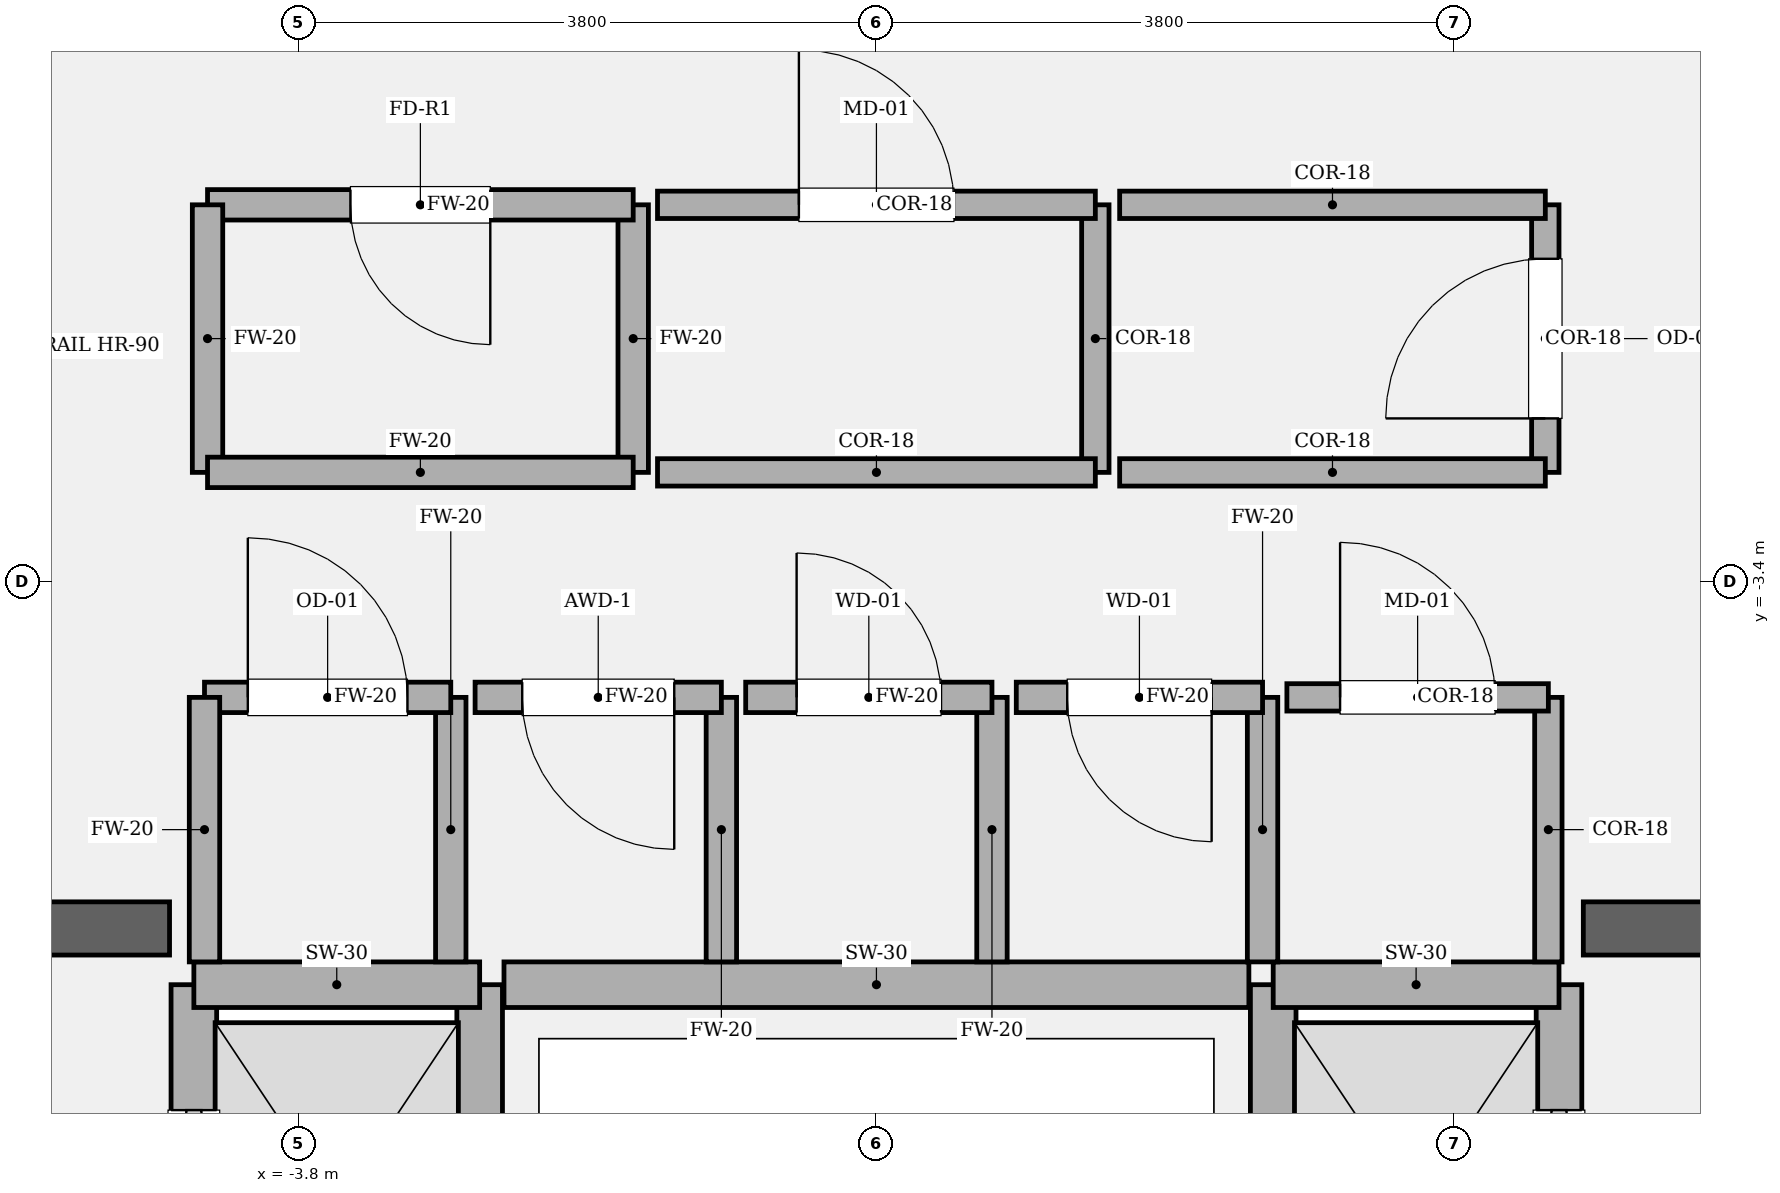
"""IFC4 building model, lengths in metres.
Left out: names, types, materials, properties, quantities, classifications, styles, units other than length and angle.
Written with IfcOpenShell. Run it as: python <this file> out.ifc"""

import sys

from ifc_helpers import new_model, si_unit, direction, frame, frame_2d, origin, place, context, subcontext, project, spatial, rectangle, extrude, element, fill, save


model = new_model("IFC4")
c1 = context("Model", 3, precision=1e-05, world=origin(), true_north=direction((0.0, 1.0)))
c2 = subcontext(c1, "Body", "Model", "MODEL_VIEW")
j1 = project(units=[si_unit("LENGTHUNIT", "METRE"), si_unit("PLANEANGLEUNIT", "RADIAN")], contexts=[c1])
p1 = place(None, origin())
s1 = spatial("IfcSite", under=j1, at=p1, CompositionType="ELEMENT")
p2 = place(p1, origin())
s2 = spatial("IfcBuilding", under=s1, at=p2, CompositionType="ELEMENT")
p3 = place(p2, frame((0.0, 0.0, 168.15)))
s3 = spatial("IfcBuildingStorey", under=s2, at=p3, CompositionType="ELEMENT", Elevation=168.15)
p4 = place(p3, frame((-9.875, -5.68, 0.0), z_axis=(0.0, 0.0, 1.0), x_axis=(1.0, 0.0, 0.0)))
e1 = element("IfcWall", 1, at=p4, inside=s3, PredefinedType="SOLIDWALL", context=c2, shape_type="SweptSolid", body=[
    extrude(rectangle(XDim=5.225, YDim=0.35, at=frame_2d((2.613, 0.0))), origin(), (0.0, 0.0, 1.0), 4.05),
])
p5 = place(p4, frame((1.335, 0.0, 0.0)))
e2 = element("IfcOpeningElement", 2, at=p5, cuts=e1, PredefinedType="OPENING", context=c2, shape_type="SweptSolid", body=[
    extrude(rectangle(XDim=1.18, YDim=2.2, at=frame_2d((0.59, 1.1))), frame((0.0, 0.185, 0.0), z_axis=(0.0, -1.0, 0.0), x_axis=(1.0, 0.0, 0.0)), (0.0, 0.0, 1.0), 0.37),
])
p6 = place(p3, frame((4.65, -5.68, 0.0), z_axis=(0.0, 0.0, 1.0), x_axis=(1.0, 0.0, 0.0)))
e3 = element("IfcWall", 3, at=p6, inside=s3, PredefinedType="SOLIDWALL", context=c2, shape_type="SweptSolid", body=[
    extrude(rectangle(XDim=5.225, YDim=0.35, at=frame_2d((2.613, 0.0))), origin(), (0.0, 0.0, 1.0), 4.05),
])
p7 = place(p6, frame((2.71, 0.0, 0.0)))
e4 = element("IfcOpeningElement", 4, at=p7, cuts=e3, PredefinedType="OPENING", context=c2, shape_type="SweptSolid", body=[
    extrude(rectangle(XDim=1.18, YDim=2.2, at=frame_2d((0.59, 1.1))), frame((0.0, 0.185, 0.0), z_axis=(0.0, -1.0, 0.0), x_axis=(1.0, 0.0, 0.0)), (0.0, 0.0, 1.0), 0.37),
])
p8 = place(p3, frame((-4.49, -8.82, 0.0), z_axis=(0.0, 0.0, 1.0), x_axis=(0.0, 1.0, 0.0)))
e5 = element("IfcWall", 5, at=p8, inside=s3, PredefinedType="SOLIDWALL", context=c2, shape_type="SweptSolid", body=[
    extrude(rectangle(XDim=2.77, YDim=0.3, at=frame_2d((1.385, 0.0))), origin(), (0.0, 0.0, 1.0), 3.77),
])
p9 = place(p8, frame((0.825, 0.0, 0.0)))
e6 = element("IfcOpeningElement", 6, at=p9, cuts=e5, PredefinedType="OPENING", context=c2, shape_type="SweptSolid", body=[
    extrude(rectangle(XDim=1.12, YDim=2.25, at=frame_2d((0.56, 1.125))), frame((0.0, 0.16, 0.0), z_axis=(0.0, -1.0, 0.0), x_axis=(1.0, 0.0, 0.0)), (0.0, 0.0, 1.0), 0.32),
])
p10 = place(p3, frame((-2.61, -8.82, 0.0), z_axis=(0.0, 0.0, 1.0), x_axis=(0.0, 1.0, 0.0)))
e7 = element("IfcWall", 7, at=p10, inside=s3, PredefinedType="SOLIDWALL", context=c2, shape_type="SweptSolid", body=[
    extrude(rectangle(XDim=2.77, YDim=0.3, at=frame_2d((1.385, 0.0))), origin(), (0.0, 0.0, 1.0), 3.77),
])
p11 = place(p3, frame((-4.49, -6.05, 0.0), z_axis=(0.0, 0.0, 1.0), x_axis=(1.0, 0.0, 0.0)))
e8 = element("IfcWall", 8, at=p11, inside=s3, PredefinedType="SOLIDWALL", context=c2, shape_type="SweptSolid", body=[
    extrude(rectangle(XDim=1.88, YDim=0.3, at=frame_2d((0.94, 0.0))), origin(), (0.0, 0.0, 1.0), 3.77),
])
p12 = place(p3, frame((4.49, -8.82, 0.0), z_axis=(0.0, 0.0, 1.0), x_axis=(0.0, 1.0, 0.0)))
e9 = element("IfcWall", 9, at=p12, inside=s3, PredefinedType="SOLIDWALL", context=c2, shape_type="SweptSolid", body=[
    extrude(rectangle(XDim=2.77, YDim=0.3, at=frame_2d((1.385, 0.0))), origin(), (0.0, 0.0, 1.0), 3.77),
])
p13 = place(p12, frame((0.825, 0.0, 0.0)))
e10 = element("IfcOpeningElement", 10, at=p13, cuts=e9, PredefinedType="OPENING", context=c2, shape_type="SweptSolid", body=[
    extrude(rectangle(XDim=1.12, YDim=2.25, at=frame_2d((0.56, 1.125))), frame((0.0, 0.16, 0.0), z_axis=(0.0, -1.0, 0.0), x_axis=(1.0, 0.0, 0.0)), (0.0, 0.0, 1.0), 0.32),
])
p14 = place(p3, frame((2.61, -8.82, 0.0), z_axis=(0.0, 0.0, 1.0), x_axis=(0.0, 1.0, 0.0)))
e11 = element("IfcWall", 11, at=p14, inside=s3, PredefinedType="SOLIDWALL", context=c2, shape_type="SweptSolid", body=[
    extrude(rectangle(XDim=2.77, YDim=0.3, at=frame_2d((1.385, 0.0))), origin(), (0.0, 0.0, 1.0), 3.77),
])
p15 = place(p3, frame((2.61, -6.05, 0.0), z_axis=(0.0, 0.0, 1.0), x_axis=(1.0, 0.0, 0.0)))
e12 = element("IfcWall", 12, at=p15, inside=s3, PredefinedType="SOLIDWALL", context=c2, shape_type="SweptSolid", body=[
    extrude(rectangle(XDim=1.88, YDim=0.3, at=frame_2d((0.94, 0.0))), origin(), (0.0, 0.0, 1.0), 3.77),
])
p16 = place(p3, frame((-2.45, -6.05, 0.0), z_axis=(0.0, 0.0, 1.0), x_axis=(1.0, 0.0, 0.0)))
e13 = element("IfcWall", 13, at=p16, inside=s3, PredefinedType="SOLIDWALL", context=c2, shape_type="SweptSolid", body=[
    extrude(rectangle(XDim=4.9, YDim=0.3, at=frame_2d((2.45, 0.0))), origin(), (0.0, 0.0, 1.0), 3.77),
])
p17 = place(p3, frame((-2.8, -5.9, 0.0), z_axis=(0.0, 0.0, 1.0), x_axis=(0.0, 1.0, 0.0)))
e14 = element("IfcWall", 14, at=p17, inside=s3, PredefinedType="SOLIDWALL", context=c2, shape_type="SweptSolid", body=[
    extrude(rectangle(XDim=1.74, YDim=0.2, at=frame_2d((0.87, 0.0))), origin(), (0.0, 0.0, 1.0), 3.77),
])
p18 = place(p3, frame((-2.8, -4.16, 0.0), z_axis=(0.0, 0.0, 1.0), x_axis=(-1.0, 0.0, 0.0)))
e15 = element("IfcWall", 15, at=p18, inside=s3, PredefinedType="SOLIDWALL", context=c2, shape_type="SweptSolid", body=[
    extrude(rectangle(XDim=1.62, YDim=0.2, at=frame_2d((0.81, 0.0))), origin(), (0.0, 0.0, 1.0), 3.77),
])
p19 = place(p18, frame((0.285, 0.0, 0.0)))
e16 = element("IfcOpeningElement", 16, at=p19, cuts=e15, PredefinedType="OPENING", context=c2, shape_type="SweptSolid", body=[
    extrude(rectangle(XDim=1.05, YDim=2.2, at=frame_2d((0.525, 1.1))), frame((0.0, 0.11, 0.0), z_axis=(0.0, -1.0, 0.0), x_axis=(1.0, 0.0, 0.0)), (0.0, 0.0, 1.0), 0.22),
])
for number, where, z_axis, x_axis in (
    (17, (-4.42, -4.16, 0.0), (0.0, 0.0, 1.0), (0.0, -1.0, 0.0)),
    (18, (-1.02, -5.9, 0.0), (0.0, 0.0, 1.0), (0.0, 1.0, 0.0)),
):
    element("IfcWall", number, at=place(p3, frame(where, z_axis=z_axis, x_axis=x_axis)), inside=s3, PredefinedType="SOLIDWALL", context=c2, shape_type="SweptSolid", body=[
        extrude(rectangle(XDim=1.74, YDim=0.2, at=frame_2d((0.87, 0.0))), origin(), (0.0, 0.0, 1.0), 3.77),
    ])
p20 = place(p3, frame((-1.02, -4.16, 0.0), z_axis=(0.0, 0.0, 1.0), x_axis=(-1.0, 0.0, 0.0)))
e19 = element("IfcWall", 19, at=p20, inside=s3, PredefinedType="SOLIDWALL", context=c2, shape_type="SweptSolid", body=[
    extrude(rectangle(XDim=1.62, YDim=0.2, at=frame_2d((0.81, 0.0))), origin(), (0.0, 0.0, 1.0), 3.77),
])
p21 = place(p20, frame((0.31, 0.0, 0.0)))
e20 = element("IfcOpeningElement", 20, at=p21, cuts=e19, PredefinedType="OPENING", context=c2, shape_type="SweptSolid", body=[
    extrude(rectangle(XDim=1.0, YDim=2.15, at=frame_2d((0.5, 1.075))), frame((0.0, 0.11, 0.0), z_axis=(0.0, -1.0, 0.0), x_axis=(1.0, 0.0, 0.0)), (0.0, 0.0, 1.0), 0.22),
])
p22 = place(p3, frame((0.76, -5.9, 0.0), z_axis=(0.0, 0.0, 1.0), x_axis=(0.0, 1.0, 0.0)))
e21 = element("IfcWall", 21, at=p22, inside=s3, PredefinedType="SOLIDWALL", context=c2, shape_type="SweptSolid", body=[
    extrude(rectangle(XDim=1.74, YDim=0.2, at=frame_2d((0.87, 0.0))), origin(), (0.0, 0.0, 1.0), 3.77),
])
p23 = place(p3, frame((0.76, -4.16, 0.0), z_axis=(0.0, 0.0, 1.0), x_axis=(-1.0, 0.0, 0.0)))
e22 = element("IfcWall", 22, at=p23, inside=s3, PredefinedType="SOLIDWALL", context=c2, shape_type="SweptSolid", body=[
    extrude(rectangle(XDim=1.62, YDim=0.2, at=frame_2d((0.81, 0.0))), origin(), (0.0, 0.0, 1.0), 3.77),
])
p24 = place(p23, frame((0.335, 0.0, 0.0)))
e23 = element("IfcOpeningElement", 23, at=p24, cuts=e22, PredefinedType="OPENING", context=c2, shape_type="SweptSolid", body=[
    extrude(rectangle(XDim=0.95, YDim=2.15, at=frame_2d((0.475, 1.075))), frame((0.0, 0.11, 0.0), z_axis=(0.0, -1.0, 0.0), x_axis=(1.0, 0.0, 0.0)), (0.0, 0.0, 1.0), 0.22),
])
p25 = place(p3, frame((2.54, -5.9, 0.0), z_axis=(0.0, 0.0, 1.0), x_axis=(0.0, 1.0, 0.0)))
e24 = element("IfcWall", 24, at=p25, inside=s3, PredefinedType="SOLIDWALL", context=c2, shape_type="SweptSolid", body=[
    extrude(rectangle(XDim=1.74, YDim=0.2, at=frame_2d((0.87, 0.0))), origin(), (0.0, 0.0, 1.0), 3.77),
])
p26 = place(p3, frame((2.54, -4.16, 0.0), z_axis=(0.0, 0.0, 1.0), x_axis=(-1.0, 0.0, 0.0)))
e25 = element("IfcWall", 25, at=p26, inside=s3, PredefinedType="SOLIDWALL", context=c2, shape_type="SweptSolid", body=[
    extrude(rectangle(XDim=1.62, YDim=0.2, at=frame_2d((0.81, 0.0))), origin(), (0.0, 0.0, 1.0), 3.77),
])
p27 = place(p26, frame((0.335, 0.0, 0.0)))
e26 = element("IfcOpeningElement", 26, at=p27, cuts=e25, PredefinedType="OPENING", context=c2, shape_type="SweptSolid", body=[
    extrude(rectangle(XDim=0.95, YDim=2.15, at=frame_2d((0.475, 1.075))), frame((0.0, 0.11, 0.0), z_axis=(0.0, -1.0, 0.0), x_axis=(1.0, 0.0, 0.0)), (0.0, 0.0, 1.0), 0.22),
])
p28 = place(p3, frame((4.42, -5.9, 0.0), z_axis=(0.0, 0.0, 1.0), x_axis=(0.0, 1.0, 0.0)))
e27 = element("IfcWall", 27, at=p28, inside=s3, PredefinedType="PARTITIONING", context=c2, shape_type="SweptSolid", body=[
    extrude(rectangle(XDim=1.74, YDim=0.18, at=frame_2d((0.87, 0.0))), origin(), (0.0, 0.0, 1.0), 3.77),
])
p29 = place(p3, frame((4.42, -4.16, 0.0), z_axis=(0.0, 0.0, 1.0), x_axis=(-1.0, 0.0, 0.0)))
e28 = element("IfcWall", 28, at=p29, inside=s3, PredefinedType="PARTITIONING", context=c2, shape_type="SweptSolid", body=[
    extrude(rectangle(XDim=1.72, YDim=0.18, at=frame_2d((0.86, 0.0))), origin(), (0.0, 0.0, 1.0), 3.77),
])
p30 = place(p29, frame((0.35, 0.0, 0.0)))
e29 = element("IfcOpeningElement", 29, at=p30, cuts=e28, PredefinedType="OPENING", context=c2, shape_type="SweptSolid", body=[
    extrude(rectangle(XDim=1.02, YDim=2.2, at=frame_2d((0.51, 1.1))), frame((0.0, 0.1, 0.0), z_axis=(0.0, -1.0, 0.0), x_axis=(1.0, 0.0, 0.0)), (0.0, 0.0, 1.0), 0.2),
])
p31 = place(p3, frame((-1.6, -2.68, 0.0), z_axis=(0.0, 0.0, 1.0), x_axis=(0.0, 1.0, 0.0)))
e30 = element("IfcWall", 30, at=p31, inside=s3, PredefinedType="SOLIDWALL", context=c2, shape_type="SweptSolid", body=[
    extrude(rectangle(XDim=1.76, YDim=0.2, at=frame_2d((0.88, 0.0))), origin(), (0.0, 0.0, 1.0), 3.77),
])
p32 = place(p3, frame((-1.6, -0.92, 0.0), z_axis=(0.0, 0.0, 1.0), x_axis=(-1.0, 0.0, 0.0)))
e31 = element("IfcWall", 31, at=p32, inside=s3, PredefinedType="SOLIDWALL", context=c2, shape_type="SweptSolid", body=[
    extrude(rectangle(XDim=2.8, YDim=0.2, at=frame_2d((1.4, 0.0))), origin(), (0.0, 0.0, 1.0), 3.77),
])
p33 = place(p32, frame((0.94, 0.0, 0.0)))
e32 = element("IfcOpeningElement", 32, at=p33, cuts=e31, PredefinedType="OPENING", context=c2, shape_type="SweptSolid", body=[
    extrude(rectangle(XDim=0.92, YDim=2.1, at=frame_2d((0.46, 1.05))), frame((0.0, 0.11, 0.0), z_axis=(0.0, -1.0, 0.0), x_axis=(1.0, 0.0, 0.0)), (0.0, 0.0, 1.0), 0.22),
])
p34 = place(p3, frame((-4.4, -0.92, 0.0), z_axis=(0.0, 0.0, 1.0), x_axis=(0.0, -1.0, 0.0)))
e33 = element("IfcWall", 33, at=p34, inside=s3, PredefinedType="SOLIDWALL", context=c2, shape_type="SweptSolid", body=[
    extrude(rectangle(XDim=1.76, YDim=0.2, at=frame_2d((0.88, 0.0))), origin(), (0.0, 0.0, 1.0), 3.77),
])
p35 = place(p3, frame((-4.4, -2.68, 0.0), z_axis=(0.0, 0.0, 1.0), x_axis=(1.0, 0.0, 0.0)))
e34 = element("IfcWall", 34, at=p35, inside=s3, PredefinedType="SOLIDWALL", context=c2, shape_type="SweptSolid", body=[
    extrude(rectangle(XDim=2.8, YDim=0.2, at=frame_2d((1.4, 0.0))), origin(), (0.0, 0.0, 1.0), 3.77),
])
p36 = place(p3, frame((1.44, -2.68, 0.0), z_axis=(0.0, 0.0, 1.0), x_axis=(0.0, 1.0, 0.0)))
e35 = element("IfcWall", 35, at=p36, inside=s3, PredefinedType="PARTITIONING", context=c2, shape_type="SweptSolid", body=[
    extrude(rectangle(XDim=1.76, YDim=0.18, at=frame_2d((0.88, 0.0))), origin(), (0.0, 0.0, 1.0), 3.77),
])
p37 = place(p3, frame((1.44, -0.92, 0.0), z_axis=(0.0, 0.0, 1.0), x_axis=(-1.0, 0.0, 0.0)))
e36 = element("IfcWall", 36, at=p37, inside=s3, PredefinedType="PARTITIONING", context=c2, shape_type="SweptSolid", body=[
    extrude(rectangle(XDim=2.88, YDim=0.18, at=frame_2d((1.44, 0.0))), origin(), (0.0, 0.0, 1.0), 3.77),
])
p38 = place(p37, frame((0.93, 0.0, 0.0)))
e37 = element("IfcOpeningElement", 37, at=p38, cuts=e36, PredefinedType="OPENING", context=c2, shape_type="SweptSolid", body=[
    extrude(rectangle(XDim=1.02, YDim=2.2, at=frame_2d((0.51, 1.1))), frame((0.0, 0.1, 0.0), z_axis=(0.0, -1.0, 0.0), x_axis=(1.0, 0.0, 0.0)), (0.0, 0.0, 1.0), 0.2),
])
p39 = place(p3, frame((-1.44, -2.68, 0.0), z_axis=(0.0, 0.0, 1.0), x_axis=(1.0, 0.0, 0.0)))
e38 = element("IfcWall", 38, at=p39, inside=s3, PredefinedType="PARTITIONING", context=c2, shape_type="SweptSolid", body=[
    extrude(rectangle(XDim=2.88, YDim=0.18, at=frame_2d((1.44, 0.0))), origin(), (0.0, 0.0, 1.0), 3.77),
])
p40 = place(p3, frame((4.4, -2.68, 0.0), z_axis=(0.0, 0.0, 1.0), x_axis=(0.0, 1.0, 0.0)))
e39 = element("IfcWall", 39, at=p40, inside=s3, PredefinedType="PARTITIONING", context=c2, shape_type="SweptSolid", body=[
    extrude(rectangle(XDim=1.76, YDim=0.18, at=frame_2d((0.88, 0.0))), origin(), (0.0, 0.0, 1.0), 3.77),
])
p41 = place(p40, frame((0.355, 0.0, 0.0)))
e40 = element("IfcOpeningElement", 40, at=p41, cuts=e39, PredefinedType="OPENING", context=c2, shape_type="SweptSolid", body=[
    extrude(rectangle(XDim=1.05, YDim=2.2, at=frame_2d((0.525, 1.1))), frame((0.0, 0.1, 0.0), z_axis=(0.0, -1.0, 0.0), x_axis=(1.0, 0.0, 0.0)), (0.0, 0.0, 1.0), 0.2),
])
for number, where, z_axis, x_axis in (
    (41, (4.4, -0.92, 0.0), (0.0, 0.0, 1.0), (-1.0, 0.0, 0.0)),
    (42, (1.6, -2.68, 0.0), (0.0, 0.0, 1.0), (1.0, 0.0, 0.0)),
):
    element("IfcWall", number, at=place(p3, frame(where, z_axis=z_axis, x_axis=x_axis)), inside=s3, PredefinedType="PARTITIONING", context=c2, shape_type="SweptSolid", body=[
        extrude(rectangle(XDim=2.8, YDim=0.18, at=frame_2d((1.4, 0.0))), origin(), (0.0, 0.0, 1.0), 3.77),
    ])
p42 = place(p9, origin())
e43 = element("IfcDoor", 43, at=p42, inside=s3, OperationType="SLIDING_TO_LEFT", PredefinedType="DOOR", context=c2, shape_type="SweptSolid", body=[
    extrude(rectangle(XDim=1.12, YDim=2.25, at=frame_2d((0.56, 1.125))), frame((0.0, 0.025, 0.0), z_axis=(0.0, -1.0, 0.0), x_axis=(1.0, 0.0, 0.0)), (0.0, 0.0, 1.0), 0.05),
])
fill(e6, e43)
p43 = place(p13, origin())
e44 = element("IfcDoor", 44, at=p43, inside=s3, OperationType="SLIDING_TO_RIGHT", PredefinedType="DOOR", context=c2, shape_type="SweptSolid", body=[
    extrude(rectangle(XDim=1.12, YDim=2.25, at=frame_2d((0.56, 1.125))), frame((0.0, 0.025, 0.0), z_axis=(0.0, -1.0, 0.0), x_axis=(1.0, 0.0, 0.0)), (0.0, 0.0, 1.0), 0.05),
])
fill(e10, e44)
p44 = place(p19, origin())
e45 = element("IfcDoor", 45, at=p44, inside=s3, OperationType="SINGLE_SWING_RIGHT", PredefinedType="DOOR", context=c2, shape_type="SweptSolid", body=[
    extrude(rectangle(XDim=1.05, YDim=2.2, at=frame_2d((0.525, 1.1))), frame((0.0, 0.025, 0.0), z_axis=(0.0, -1.0, 0.0), x_axis=(1.0, 0.0, 0.0)), (0.0, 0.0, 1.0), 0.05),
])
fill(e16, e45)
p45 = place(p21, origin())
e46 = element("IfcDoor", 46, at=p45, inside=s3, OperationType="SINGLE_SWING_LEFT", PredefinedType="DOOR", context=c2, shape_type="SweptSolid", body=[
    extrude(rectangle(XDim=1.0, YDim=2.15, at=frame_2d((0.5, 1.075))), frame((0.0, 0.025, 0.0), z_axis=(0.0, -1.0, 0.0), x_axis=(1.0, 0.0, 0.0)), (0.0, 0.0, 1.0), 0.05),
])
fill(e20, e46)
p46 = place(p24, origin())
e47 = element("IfcDoor", 47, at=p46, inside=s3, OperationType="SINGLE_SWING_RIGHT", PredefinedType="DOOR", context=c2, shape_type="SweptSolid", body=[
    extrude(rectangle(XDim=0.95, YDim=2.15, at=frame_2d((0.475, 1.075))), frame((0.0, 0.025, 0.0), z_axis=(0.0, -1.0, 0.0), x_axis=(1.0, 0.0, 0.0)), (0.0, 0.0, 1.0), 0.05),
])
fill(e23, e47)
p47 = place(p27, origin())
e48 = element("IfcDoor", 48, at=p47, inside=s3, OperationType="SINGLE_SWING_LEFT", PredefinedType="DOOR", context=c2, shape_type="SweptSolid", body=[
    extrude(rectangle(XDim=0.95, YDim=2.15, at=frame_2d((0.475, 1.075))), frame((0.0, 0.025, 0.0), z_axis=(0.0, -1.0, 0.0), x_axis=(1.0, 0.0, 0.0)), (0.0, 0.0, 1.0), 0.05),
])
fill(e26, e48)
p48 = place(p30, origin())
e49 = element("IfcDoor", 49, at=p48, inside=s3, OperationType="SINGLE_SWING_RIGHT", PredefinedType="DOOR", context=c2, shape_type="SweptSolid", body=[
    extrude(rectangle(XDim=1.02, YDim=2.2, at=frame_2d((0.51, 1.1))), frame((0.0, 0.025, 0.0), z_axis=(0.0, -1.0, 0.0), x_axis=(1.0, 0.0, 0.0)), (0.0, 0.0, 1.0), 0.05),
])
fill(e29, e49)
p49 = place(p33, origin())
e50 = element("IfcDoor", 50, at=p49, inside=s3, OperationType="SINGLE_SWING_LEFT", PredefinedType="DOOR", context=c2, shape_type="SweptSolid", body=[
    extrude(rectangle(XDim=0.92, YDim=2.1, at=frame_2d((0.46, 1.05))), frame((0.0, 0.025, 0.0), z_axis=(0.0, -1.0, 0.0), x_axis=(1.0, 0.0, 0.0)), (0.0, 0.0, 1.0), 0.05),
])
fill(e32, e50)
p50 = place(p38, origin())
e51 = element("IfcDoor", 51, at=p50, inside=s3, OperationType="SINGLE_SWING_RIGHT", PredefinedType="DOOR", context=c2, shape_type="SweptSolid", body=[
    extrude(rectangle(XDim=1.02, YDim=2.2, at=frame_2d((0.51, 1.1))), frame((0.0, 0.025, 0.0), z_axis=(0.0, -1.0, 0.0), x_axis=(1.0, 0.0, 0.0)), (0.0, 0.0, 1.0), 0.05),
])
fill(e37, e51)
p51 = place(p41, origin())
e52 = element("IfcDoor", 52, at=p51, inside=s3, OperationType="SINGLE_SWING_LEFT", PredefinedType="DOOR", context=c2, shape_type="SweptSolid", body=[
    extrude(rectangle(XDim=1.05, YDim=2.2, at=frame_2d((0.525, 1.1))), frame((0.0, 0.025, 0.0), z_axis=(0.0, -1.0, 0.0), x_axis=(1.0, 0.0, 0.0)), (0.0, 0.0, 1.0), 0.05),
])
fill(e40, e52)
save(model, sys.argv[1])
